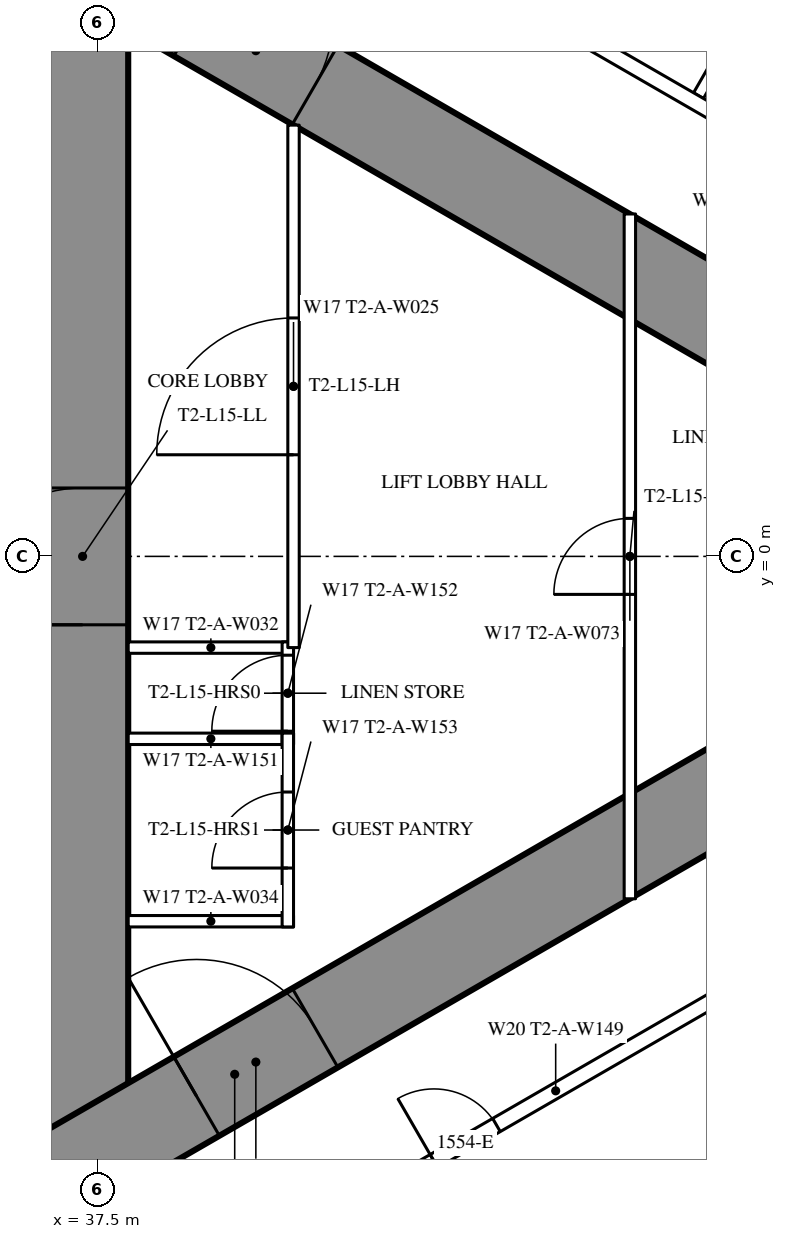
"""IFC4 building model, lengths in metres.
Left out: names, types, materials, properties, quantities, classifications, styles, units other than length and angle.
Written with IfcOpenShell. Run it as: python <this file> out.ifc"""

import sys

from ifc_helpers import new_model, si_unit, direction, frame, frame_2d, origin, place, context, subcontext, project, spatial, rectangle, extrude, element, fill, save


model = new_model("IFC4")
c1 = context("Model", 3, precision=1e-05, world=origin(), true_north=direction((0.0, 1.0)))
c2 = subcontext(c1, "Body", "Model", "MODEL_VIEW")
j1 = project(units=[si_unit("LENGTHUNIT", "METRE"), si_unit("PLANEANGLEUNIT", "RADIAN")], contexts=[c1])
p1 = place(None, origin())
s1 = spatial("IfcSite", under=j1, at=p1, CompositionType="ELEMENT")
p2 = place(p1, origin())
s2 = spatial("IfcBuilding", under=s1, at=p2, CompositionType="ELEMENT")
p3 = place(p2, frame((0.0, 0.0, 60.0)))
s3 = spatial("IfcBuildingStorey", under=s2, at=p3, CompositionType="ELEMENT", Elevation=60.0)
p4 = place(p3, frame((37.3, -8.6, 0.0), z_axis=(0.0, 0.0, 1.0), x_axis=(0.0, 1.0, 0.0)))
e1 = element("IfcWall", 1, at=p4, inside=s3, PredefinedType="SHEAR", context=c2, shape_type="SweptSolid", body=[
    extrude(rectangle(XDim=17.2, YDim=1.2, at=frame_2d((8.6, 0.0))), origin(), (0.0, 0.0, 1.0), 3.5),
])
p5 = place(p4, frame((7.7, 0.0, 0.0)))
e2 = element("IfcOpeningElement", 2, at=p5, cuts=e1, PredefinedType="OPENING", context=c2, shape_type="SweptSolid", body=[
    extrude(rectangle(XDim=1.8, YDim=2.2, at=frame_2d((0.9, 1.1))), frame((0.0, 0.61, 0.0), z_axis=(0.0, -1.0, 0.0), x_axis=(1.0, 0.0, 0.0)), (0.0, 0.0, 1.0), 1.22),
])
p6 = place(p3, frame((27.2, -13.8, 0.0), z_axis=(0.0, 0.0, 1.0), x_axis=(0.866027159892, 0.499996958321, 0.0)))
e3 = element("IfcWall", 3, at=p6, inside=s3, PredefinedType="SHEAR", context=c2, shape_type="SweptSolid", body=[
    extrude(rectangle(XDim=27.947, YDim=1.2, at=frame_2d((13.973, 0.0))), origin(), (0.0, 0.0, 1.0), 3.5),
])
p7 = place(p6, frame((4.6, 0.0, 0.0)))
e4 = element("IfcOpeningElement", 4, at=p7, cuts=e3, PredefinedType="OPENING", context=c2, shape_type="SweptSolid", body=[
    extrude(rectangle(XDim=1.0, YDim=2.2, at=frame_2d((0.5, 1.1))), frame((0.0, 0.61, 0.0), z_axis=(0.0, -1.0, 0.0), x_axis=(1.0, 0.0, 0.0)), (0.0, 0.0, 1.0), 1.22),
])
p8 = place(p6, frame((13.395, 0.0, 0.0)))
e5 = element("IfcOpeningElement", 5, at=p8, cuts=e3, PredefinedType="OPENING", context=c2, shape_type="SweptSolid", body=[
    extrude(rectangle(XDim=1.8, YDim=2.2, at=frame_2d((0.9, 1.1))), frame((0.0, 0.61, 0.0), z_axis=(0.0, -1.0, 0.0), x_axis=(1.0, 0.0, 0.0)), (0.0, 0.0, 1.0), 1.22),
])
p9 = place(p3, frame((27.2, 13.8, 0.0), z_axis=(0.0, 0.0, 1.0), x_axis=(0.866024515034, -0.500001539357, 0.0)))
e6 = element("IfcWall", 6, at=p9, inside=s3, PredefinedType="SHEAR", context=c2, shape_type="SweptSolid", body=[
    extrude(rectangle(XDim=26.907, YDim=1.2, at=frame_2d((13.454, 0.0))), origin(), (0.0, 0.0, 1.0), 3.5),
])
p10 = place(p9, frame((4.6, 0.0, 0.0)))
e7 = element("IfcOpeningElement", 7, at=p10, cuts=e6, PredefinedType="OPENING", context=c2, shape_type="SweptSolid", body=[
    extrude(rectangle(XDim=1.0, YDim=2.2, at=frame_2d((0.5, 1.1))), frame((0.0, 0.61, 0.0), z_axis=(0.0, -1.0, 0.0), x_axis=(1.0, 0.0, 0.0)), (0.0, 0.0, 1.0), 1.22),
])
p11 = place(p9, frame((13.395, 0.0, 0.0)))
e8 = element("IfcOpeningElement", 8, at=p11, cuts=e6, PredefinedType="OPENING", context=c2, shape_type="SweptSolid", body=[
    extrude(rectangle(XDim=1.8, YDim=2.2, at=frame_2d((0.9, 1.1))), frame((0.0, 0.61, 0.0), z_axis=(0.0, -1.0, 0.0), x_axis=(1.0, 0.0, 0.0)), (0.0, 0.0, 1.0), 1.22),
])
p12 = place(p3, frame((45.403, 6.062, 0.0), z_axis=(0.0, 0.0, 1.0), x_axis=(0.500013434677, 0.866017647131, 0.0)))
e9 = element("IfcWall", 9, at=p12, inside=s3, PredefinedType="PARTITIONING", context=c2, shape_type="SweptSolid", body=[
    extrude(rectangle(XDim=9.902, YDim=0.15, at=frame_2d((4.951, 0.0))), origin(), (0.0, 0.0, 1.0), 2.25),
])
p13 = place(p3, frame((36.834, 10.894, 0.0), z_axis=(0.0, 0.0, 1.0), x_axis=(0.866028157229, -0.499995230863, 0.0)))
e10 = element("IfcWall", 10, at=p13, inside=s3, PredefinedType="PARTITIONING", context=c2, shape_type="SweptSolid", body=[
    extrude(rectangle(XDim=21.667, YDim=0.2, at=frame_2d((10.833, 0.0))), origin(), (0.0, 0.0, 1.0), 3.25),
])
p14 = place(p13, frame((14.55, 0.0, 0.0)))
e11 = element("IfcOpeningElement", 11, at=p14, cuts=e10, PredefinedType="OPENING", context=c2, shape_type="SweptSolid", body=[
    extrude(rectangle(XDim=0.95, YDim=2.2, at=frame_2d((0.475, 1.1))), frame((0.0, 0.11, 0.0), z_axis=(0.0, -1.0, 0.0), x_axis=(1.0, 0.0, 0.0)), (0.0, 0.0, 1.0), 0.22),
])
p15 = place(p13, frame((10.5, 0.0, 0.0)))
e12 = element("IfcOpeningElement", 12, at=p15, cuts=e10, PredefinedType="OPENING", context=c2, shape_type="SweptSolid", body=[
    extrude(rectangle(XDim=0.95, YDim=2.2, at=frame_2d((0.475, 1.1))), frame((0.0, 0.11, 0.0), z_axis=(0.0, -1.0, 0.0), x_axis=(1.0, 0.0, 0.0)), (0.0, 0.0, 1.0), 0.22),
])
p16 = place(p13, frame((4.292, 0.0, 0.0)))
e13 = element("IfcOpeningElement", 13, at=p16, cuts=e10, PredefinedType="OPENING", context=c2, shape_type="SweptSolid", body=[
    extrude(rectangle(XDim=1.0, YDim=2.2, at=frame_2d((0.5, 1.1))), frame((0.0, 0.11, 0.0), z_axis=(0.0, -1.0, 0.0), x_axis=(1.0, 0.0, 0.0)), (0.0, 0.0, 1.0), 0.22),
])
p17 = place(p13, frame((0.246, 0.0, 0.0)))
e14 = element("IfcOpeningElement", 14, at=p17, cuts=e10, PredefinedType="OPENING", context=c2, shape_type="SweptSolid", body=[
    extrude(rectangle(XDim=0.9, YDim=2.2, at=frame_2d((0.45, 1.1))), frame((0.0, 0.11, 0.0), z_axis=(0.0, -1.0, 0.0), x_axis=(1.0, 0.0, 0.0)), (0.0, 0.0, 1.0), 0.22),
])
p18 = place(p3, frame((37.96, -10.243, 0.0), z_axis=(0.0, 0.0, 1.0), x_axis=(0.866030548046, 0.499991089772, 0.0)))
e15 = element("IfcWall", 15, at=p18, inside=s3, PredefinedType="PARTITIONING", context=c2, shape_type="SweptSolid", body=[
    extrude(rectangle(XDim=12.849, YDim=0.2, at=frame_2d((6.425, 0.0))), origin(), (0.0, 0.0, 1.0), 3.25),
])
p19 = place(p18, frame((4.575, 0.0, 0.0)))
e16 = element("IfcOpeningElement", 16, at=p19, cuts=e15, PredefinedType="OPENING", context=c2, shape_type="SweptSolid", body=[
    extrude(rectangle(XDim=0.95, YDim=2.2, at=frame_2d((0.475, 1.1))), frame((0.0, 0.11, 0.0), z_axis=(0.0, -1.0, 0.0), x_axis=(1.0, 0.0, 0.0)), (0.0, 0.0, 1.0), 0.22),
])
p20 = place(p18, frame((0.6, 0.0, 0.0)))
e17 = element("IfcOpeningElement", 17, at=p20, cuts=e15, PredefinedType="OPENING", context=c2, shape_type="SweptSolid", body=[
    extrude(rectangle(XDim=0.95, YDim=2.2, at=frame_2d((0.475, 1.1))), frame((0.0, 0.11, 0.0), z_axis=(0.0, -1.0, 0.0), x_axis=(1.0, 0.0, 0.0)), (0.0, 0.0, 1.0), 0.22),
])
for number, where, z_axis, x_axis in (
    (18, (37.9, -1.2, 0.0), (0.0, 0.0, 1.0), (1.0, 0.0, 0.0)),
    (19, (37.9, -2.4, 0.0), (0.0, 0.0, 1.0), (1.0, 0.0, 0.0)),
    (20, (37.9, -4.8, 0.0), (0.0, 0.0, 1.0), (1.0, 0.0, 0.0)),
):
    element("IfcWall", number, at=place(p3, frame(where, z_axis=z_axis, x_axis=x_axis)), inside=s3, PredefinedType="PARTITIONING", context=c2, shape_type="SweptSolid", body=[
        extrude(rectangle(XDim=2.175, YDim=0.15, at=frame_2d((1.087, 0.0))), origin(), (0.0, 0.0, 1.0), 3.25),
    ])
p21 = place(p3, frame((40.0, -2.475, 0.0), z_axis=(0.0, 0.0, 1.0), x_axis=(0.0, 1.0, 0.0)))
e21 = element("IfcWall", 21, at=p21, inside=s3, PredefinedType="PARTITIONING", context=c2, shape_type="SweptSolid", body=[
    extrude(rectangle(XDim=1.35, YDim=0.15, at=frame_2d((0.675, 0.0))), origin(), (0.0, 0.0, 1.0), 3.25),
])
p22 = place(p21, frame((0.175, 0.0, 0.0)))
e22 = element("IfcOpeningElement", 22, at=p22, cuts=e21, PredefinedType="OPENING", context=c2, shape_type="SweptSolid", body=[
    extrude(rectangle(XDim=1.0, YDim=2.2, at=frame_2d((0.5, 1.1))), frame((0.0, 0.085, 0.0), z_axis=(0.0, -1.0, 0.0), x_axis=(1.0, 0.0, 0.0)), (0.0, 0.0, 1.0), 0.17),
])
p23 = place(p3, frame((40.0, -4.875, 0.0), z_axis=(0.0, 0.0, 1.0), x_axis=(0.0, 1.0, 0.0)))
e23 = element("IfcWall", 23, at=p23, inside=s3, PredefinedType="PARTITIONING", context=c2, shape_type="SweptSolid", body=[
    extrude(rectangle(XDim=2.55, YDim=0.15, at=frame_2d((1.275, 0.0))), origin(), (0.0, 0.0, 1.0), 3.25),
])
p24 = place(p23, frame((0.775, 0.0, 0.0)))
e24 = element("IfcOpeningElement", 24, at=p24, cuts=e23, PredefinedType="OPENING", context=c2, shape_type="SweptSolid", body=[
    extrude(rectangle(XDim=1.0, YDim=2.2, at=frame_2d((0.5, 1.1))), frame((0.0, 0.085, 0.0), z_axis=(0.0, -1.0, 0.0), x_axis=(1.0, 0.0, 0.0)), (0.0, 0.0, 1.0), 0.17),
])
p25 = place(p3, frame((40.075, -1.2, 0.0), z_axis=(0.0, 0.0, 1.0), x_axis=(0.0, 1.0, 0.0)))
e25 = element("IfcWall", 25, at=p25, inside=s3, PredefinedType="PARTITIONING", context=c2, shape_type="SweptSolid", body=[
    extrude(rectangle(XDim=6.874, YDim=0.15, at=frame_2d((3.437, 0.0))), origin(), (0.0, 0.0, 1.0), 3.25),
])
p26 = place(p25, frame((2.537, 0.0, 0.0)))
e26 = element("IfcOpeningElement", 26, at=p26, cuts=e25, PredefinedType="OPENING", context=c2, shape_type="SweptSolid", body=[
    extrude(rectangle(XDim=1.8, YDim=2.2, at=frame_2d((0.9, 1.1))), frame((0.0, 0.085, 0.0), z_axis=(0.0, -1.0, 0.0), x_axis=(1.0, 0.0, 0.0)), (0.0, 0.0, 1.0), 0.17),
])
p27 = place(p3, frame((44.5, -4.505, 0.0), z_axis=(0.0, 0.0, 1.0), x_axis=(0.0, 1.0, 0.0)))
e27 = element("IfcWall", 27, at=p27, inside=s3, PredefinedType="PARTITIONING", context=c2, shape_type="SweptSolid", body=[
    extrude(rectangle(XDim=9.009, YDim=0.15, at=frame_2d((4.505, 0.0))), origin(), (0.0, 0.0, 1.0), 2.45),
])
p28 = place(p27, frame((4.005, 0.0, 0.0)))
e28 = element("IfcOpeningElement", 28, at=p28, cuts=e27, PredefinedType="OPENING", context=c2, shape_type="SweptSolid", body=[
    extrude(rectangle(XDim=1.0, YDim=2.2, at=frame_2d((0.5, 1.1))), frame((0.0, 0.085, 0.0), z_axis=(0.0, -1.0, 0.0), x_axis=(1.0, 0.0, 0.0)), (0.0, 0.0, 1.0), 0.17),
])
p29 = place(p19, origin())
e29 = element("IfcDoor", 29, at=p29, inside=s3, OperationType="SINGLE_SWING_LEFT", PredefinedType="DOOR", context=c2, shape_type="SweptSolid", body=[
    extrude(rectangle(XDim=0.95, YDim=2.2, at=frame_2d((0.475, 1.1))), frame((0.0, 0.025, 0.0), z_axis=(0.0, -1.0, 0.0), x_axis=(1.0, 0.0, 0.0)), (0.0, 0.0, 1.0), 0.05),
])
fill(e16, e29)
p30 = place(p22, origin())
e30 = element("IfcDoor", 30, at=p30, inside=s3, OperationType="SINGLE_SWING_LEFT", PredefinedType="DOOR", context=c2, shape_type="SweptSolid", body=[
    extrude(rectangle(XDim=1.0, YDim=2.2, at=frame_2d((0.5, 1.1))), frame((0.0, 0.025, 0.0), z_axis=(0.0, -1.0, 0.0), x_axis=(1.0, 0.0, 0.0)), (0.0, 0.0, 1.0), 0.05),
])
fill(e22, e30)
p31 = place(p24, origin())
e31 = element("IfcDoor", 31, at=p31, inside=s3, OperationType="SINGLE_SWING_LEFT", PredefinedType="DOOR", context=c2, shape_type="SweptSolid", body=[
    extrude(rectangle(XDim=1.0, YDim=2.2, at=frame_2d((0.5, 1.1))), frame((0.0, 0.025, 0.0), z_axis=(0.0, -1.0, 0.0), x_axis=(1.0, 0.0, 0.0)), (0.0, 0.0, 1.0), 0.05),
])
fill(e24, e31)
p32 = place(p26, origin())
e32 = element("IfcDoor", 32, at=p32, inside=s3, OperationType="DOUBLE_DOOR_SINGLE_SWING", PredefinedType="DOOR", context=c2, shape_type="SweptSolid", body=[
    extrude(rectangle(XDim=1.8, YDim=2.2, at=frame_2d((0.9, 1.1))), frame((0.0, 0.025, 0.0), z_axis=(0.0, -1.0, 0.0), x_axis=(1.0, 0.0, 0.0)), (0.0, 0.0, 1.0), 0.05),
])
fill(e26, e32)
p33 = place(p28, origin())
e33 = element("IfcDoor", 33, at=p33, inside=s3, OperationType="SINGLE_SWING_LEFT", PredefinedType="DOOR", context=c2, shape_type="SweptSolid", body=[
    extrude(rectangle(XDim=1.0, YDim=2.2, at=frame_2d((0.5, 1.1))), frame((0.0, 0.025, 0.0), z_axis=(0.0, -1.0, 0.0), x_axis=(1.0, 0.0, 0.0)), (0.0, 0.0, 1.0), 0.05),
])
fill(e28, e33)
p34 = place(p8, origin())
e34 = element("IfcDoor", 34, at=p34, inside=s3, OperationType="DOUBLE_DOOR_SINGLE_SWING", PredefinedType="DOOR", context=c2, shape_type="SweptSolid", body=[
    extrude(rectangle(XDim=1.8, YDim=2.2, at=frame_2d((0.9, 1.1))), frame((0.0, 0.025, 0.0), z_axis=(0.0, -1.0, 0.0), x_axis=(1.0, 0.0, 0.0)), (0.0, 0.0, 1.0), 0.05),
])
fill(e5, e34)
p35 = place(p11, origin())
e35 = element("IfcDoor", 35, at=p35, inside=s3, OperationType="DOUBLE_DOOR_SINGLE_SWING", PredefinedType="DOOR", context=c2, shape_type="SweptSolid", body=[
    extrude(rectangle(XDim=1.8, YDim=2.2, at=frame_2d((0.9, 1.1))), frame((0.0, 0.025, 0.0), z_axis=(0.0, -1.0, 0.0), x_axis=(1.0, 0.0, 0.0)), (0.0, 0.0, 1.0), 0.05),
])
fill(e8, e35)
p36 = place(p5, origin())
e36 = element("IfcDoor", 36, at=p36, inside=s3, OperationType="DOUBLE_DOOR_SINGLE_SWING", PredefinedType="DOOR", context=c2, shape_type="SweptSolid", body=[
    extrude(rectangle(XDim=1.8, YDim=2.2, at=frame_2d((0.9, 1.1))), frame((0.0, 0.025, 0.0), z_axis=(0.0, -1.0, 0.0), x_axis=(1.0, 0.0, 0.0)), (0.0, 0.0, 1.0), 0.05),
])
fill(e2, e36)
save(model, sys.argv[1])
